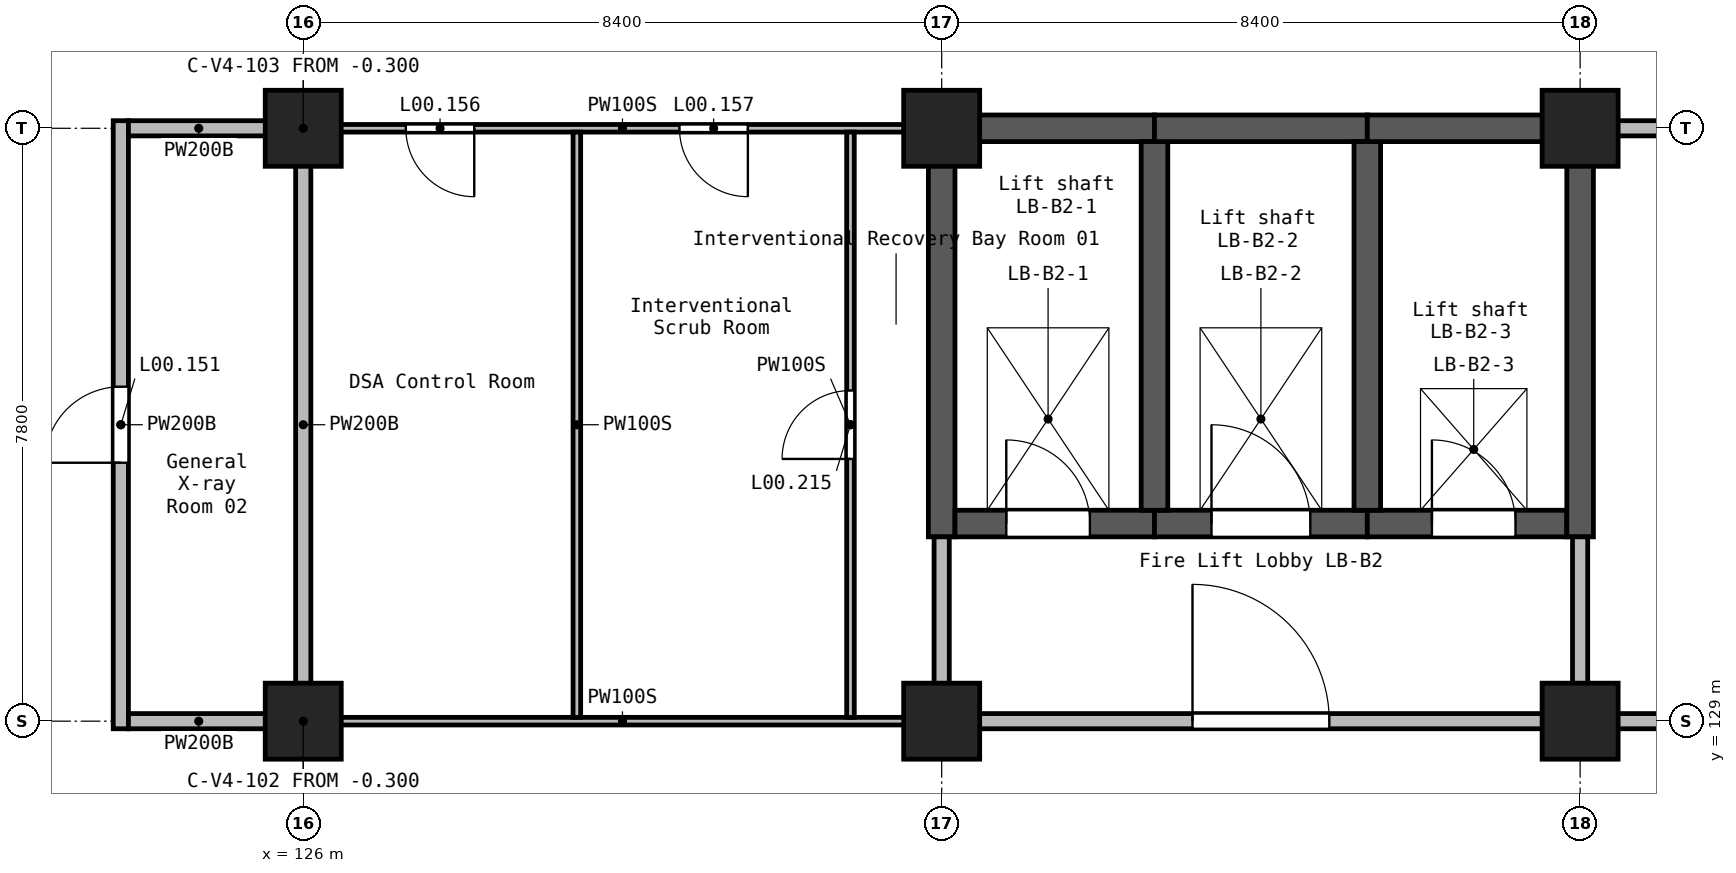
"""IFC4 building model, lengths in metres.
Left out: names, types, materials, properties, quantities, classifications, styles, units other than length and angle.
Written with IfcOpenShell. Run it as: python <this file> out.ifc"""

import sys

from ifc_helpers import new_model, si_unit, direction, frame, frame_2d, origin, origin_2d, place, context, subcontext, project, spatial, rectangle, extrude, element, fill, save


model = new_model("IFC4")
c1 = context("Model", 3, precision=1e-05, world=origin(), true_north=direction((0.0, 1.0)))
c2 = subcontext(c1, "Body", "Model", "MODEL_VIEW")
j1 = project(units=[si_unit("LENGTHUNIT", "METRE"), si_unit("PLANEANGLEUNIT", "RADIAN")], contexts=[c1])
p1 = place(None, origin())
s1 = spatial("IfcSite", under=j1, at=p1, CompositionType="ELEMENT")
p2 = place(p1, origin())
s2 = spatial("IfcBuilding", under=s1, at=p2, CompositionType="ELEMENT")
p3 = place(p2, origin())
s3 = spatial("IfcBuildingStorey", under=s2, at=p3, CompositionType="ELEMENT", Elevation=0.0)
for number, where, z_axis, x_axis in (
    (1, (126.0, 129.0, -0.3), (0.0, 0.0, 1.0), (1.0, 0.0, 0.0)),
    (2, (126.0, 136.8, -0.3), (0.0, 0.0, 1.0), (1.0, 0.0, 0.0)),
    (3, (134.4, 129.0, -0.3), (0.0, 0.0, 1.0), (1.0, 0.0, 0.0)),
    (4, (134.4, 136.8, -0.3), (0.0, 0.0, 1.0), (1.0, 0.0, 0.0)),
    (5, (142.8, 129.0, -0.3), (0.0, 0.0, 1.0), (1.0, 0.0, 0.0)),
    (6, (142.8, 136.8, -0.3), (0.0, 0.0, 1.0), (1.0, 0.0, 0.0)),
):
    element("IfcColumn", number, at=place(p3, frame(where, z_axis=z_axis, x_axis=x_axis)), inside=s3, PredefinedType="COLUMN", context=c2, shape_type="SweptSolid", body=[
        extrude(rectangle(XDim=1.0, YDim=1.0, at=origin_2d()), origin(), (0.0, 0.0, 1.0), 5.7),
    ])
p4 = place(p3, frame((134.225, 136.8, -0.3), z_axis=(0.0, 0.0, 1.0), x_axis=(1.0, 0.0, 0.0)))
e7 = element("IfcWall", 7, at=p4, inside=s3, PredefinedType="SHEAR", context=c2, shape_type="SweptSolid", body=[
    extrude(rectangle(XDim=2.975, YDim=0.35, at=frame_2d((1.487, 0.0))), origin(), (0.0, 0.0, 1.0), 5.7),
])
p5 = place(p3, frame((134.4, 131.425, -0.3), z_axis=(0.0, 0.0, 1.0), x_axis=(0.0, 1.0, 0.0)))
e8 = element("IfcWall", 8, at=p5, inside=s3, PredefinedType="SHEAR", context=c2, shape_type="SweptSolid", body=[
    extrude(rectangle(XDim=5.2, YDim=0.35, at=frame_2d((2.6, 0.0))), origin(), (0.0, 0.0, 1.0), 5.7),
])
p6 = place(p3, frame((134.575, 131.6, -0.3), z_axis=(0.0, 0.0, 1.0), x_axis=(1.0, 0.0, 0.0)))
e9 = element("IfcWall", 9, at=p6, inside=s3, PredefinedType="SHEAR", context=c2, shape_type="SweptSolid", body=[
    extrude(rectangle(XDim=2.625, YDim=0.35, at=frame_2d((1.312, 0.0))), origin(), (0.0, 0.0, 1.0), 5.7),
])
p7 = place(p6, frame((0.675, 0.0, 0.3)))
e10 = element("IfcOpeningElement", 10, at=p7, cuts=e9, PredefinedType="OPENING", context=c2, shape_type="SweptSolid", body=[
    extrude(rectangle(XDim=1.1, YDim=2.1, at=frame_2d((0.55, 1.05))), frame((0.0, 0.185, 0.0), z_axis=(0.0, -1.0, 0.0), x_axis=(1.0, 0.0, 0.0)), (0.0, 0.0, 1.0), 0.37),
])
p8 = place(p3, frame((137.2, 131.6, -0.3), z_axis=(0.0, 0.0, 1.0), x_axis=(1.0, 0.0, 0.0)))
e11 = element("IfcWall", 11, at=p8, inside=s3, PredefinedType="SHEAR", context=c2, shape_type="SweptSolid", body=[
    extrude(rectangle(XDim=2.8, YDim=0.35, at=frame_2d((1.4, 0.0))), origin(), (0.0, 0.0, 1.0), 5.7),
])
p9 = place(p8, frame((0.75, 0.0, 0.3)))
e12 = element("IfcOpeningElement", 12, at=p9, cuts=e11, PredefinedType="OPENING", context=c2, shape_type="SweptSolid", body=[
    extrude(rectangle(XDim=1.3, YDim=2.1, at=frame_2d((0.65, 1.05))), frame((0.0, 0.185, 0.0), z_axis=(0.0, -1.0, 0.0), x_axis=(1.0, 0.0, 0.0)), (0.0, 0.0, 1.0), 0.37),
])
p10 = place(p3, frame((137.2, 131.775, -0.3), z_axis=(0.0, 0.0, 1.0), x_axis=(0.0, 1.0, 0.0)))
e13 = element("IfcWall", 13, at=p10, inside=s3, PredefinedType="SHEAR", context=c2, shape_type="SweptSolid", body=[
    extrude(rectangle(XDim=4.85, YDim=0.35, at=frame_2d((2.425, 0.0))), origin(), (0.0, 0.0, 1.0), 5.7),
])
p11 = place(p3, frame((137.2, 136.8, -0.3), z_axis=(0.0, 0.0, 1.0), x_axis=(1.0, 0.0, 0.0)))
e14 = element("IfcWall", 14, at=p11, inside=s3, PredefinedType="SHEAR", context=c2, shape_type="SweptSolid", body=[
    extrude(rectangle(XDim=2.8, YDim=0.35, at=frame_2d((1.4, 0.0))), origin(), (0.0, 0.0, 1.0), 5.7),
])
p12 = place(p3, frame((140.0, 131.6, -0.3), z_axis=(0.0, 0.0, 1.0), x_axis=(1.0, 0.0, 0.0)))
e15 = element("IfcWall", 15, at=p12, inside=s3, PredefinedType="SHEAR", context=c2, shape_type="SweptSolid", body=[
    extrude(rectangle(XDim=2.625, YDim=0.35, at=frame_2d((1.312, 0.0))), origin(), (0.0, 0.0, 1.0), 5.7),
])
p13 = place(p12, frame((0.85, 0.0, 0.3)))
e16 = element("IfcOpeningElement", 16, at=p13, cuts=e15, PredefinedType="OPENING", context=c2, shape_type="SweptSolid", body=[
    extrude(rectangle(XDim=1.1, YDim=2.1, at=frame_2d((0.55, 1.05))), frame((0.0, 0.185, 0.0), z_axis=(0.0, -1.0, 0.0), x_axis=(1.0, 0.0, 0.0)), (0.0, 0.0, 1.0), 0.37),
])
p14 = place(p3, frame((140.0, 131.775, -0.3), z_axis=(0.0, 0.0, 1.0), x_axis=(0.0, 1.0, 0.0)))
e17 = element("IfcWall", 17, at=p14, inside=s3, PredefinedType="SHEAR", context=c2, shape_type="SweptSolid", body=[
    extrude(rectangle(XDim=4.85, YDim=0.35, at=frame_2d((2.425, 0.0))), origin(), (0.0, 0.0, 1.0), 5.7),
])
p15 = place(p3, frame((140.0, 136.8, -0.3), z_axis=(0.0, 0.0, 1.0), x_axis=(1.0, 0.0, 0.0)))
e18 = element("IfcWall", 18, at=p15, inside=s3, PredefinedType="SHEAR", context=c2, shape_type="SweptSolid", body=[
    extrude(rectangle(XDim=2.625, YDim=0.35, at=frame_2d((1.312, 0.0))), origin(), (0.0, 0.0, 1.0), 5.7),
])
p16 = place(p3, frame((142.8, 131.425, -0.3), z_axis=(0.0, 0.0, 1.0), x_axis=(0.0, 1.0, 0.0)))
e19 = element("IfcWall", 19, at=p16, inside=s3, PredefinedType="SHEAR", context=c2, shape_type="SweptSolid", body=[
    extrude(rectangle(XDim=5.55, YDim=0.35, at=frame_2d((2.775, 0.0))), origin(), (0.0, 0.0, 1.0), 5.7),
])
p17 = place(p3, frame((134.85, 129.0, 0.0), z_axis=(0.0, 0.0, 1.0), x_axis=(1.0, 0.0, 0.0)))
e20 = element("IfcWall", 20, at=p17, inside=s3, PredefinedType="SOLIDWALL", context=c2, shape_type="SweptSolid", body=[
    extrude(rectangle(XDim=7.5, YDim=0.2, at=frame_2d((3.75, 0.0))), origin(), (0.0, 0.0, 1.0), 5.05),
])
p18 = place(p17, frame((2.85, 0.0, 0.0)))
e21 = element("IfcOpeningElement", 21, at=p18, cuts=e20, PredefinedType="OPENING", context=c2, shape_type="SweptSolid", body=[
    extrude(rectangle(XDim=1.8, YDim=2.1, at=frame_2d((0.9, 1.05))), frame((0.0, 0.11, 0.0), z_axis=(0.0, -1.0, 0.0), x_axis=(1.0, 0.0, 0.0)), (0.0, 0.0, 1.0), 0.22),
])
for number, where, z_axis, x_axis in (
    (22, (134.4, 129.45, 0.0), (0.0, 0.0, 1.0), (0.0, 1.0, 0.0)),
    (23, (142.8, 129.45, 0.0), (0.0, 0.0, 1.0), (0.0, 1.0, 0.0)),
):
    element("IfcWall", number, at=place(p3, frame(where, z_axis=z_axis, x_axis=x_axis)), inside=s3, PredefinedType="SOLIDWALL", context=c2, shape_type="SweptSolid", body=[
        extrude(rectangle(XDim=1.975, YDim=0.2, at=frame_2d((0.988, 0.0))), origin(), (0.0, 0.0, 1.0), 5.05),
    ])
p19 = place(p3, frame((143.25, 129.0, 0.0), z_axis=(0.0, 0.0, 1.0), x_axis=(1.0, 0.0, 0.0)))
e24 = element("IfcWall", 24, at=p19, inside=s3, PredefinedType="SOLIDWALL", context=c2, shape_type="SweptSolid", body=[
    extrude(rectangle(XDim=7.5, YDim=0.2, at=frame_2d((3.75, 0.0))), origin(), (0.0, 0.0, 1.0), 5.05),
])
p20 = place(p19, frame((3.25, 0.0, 0.0)))
e25 = element("IfcOpeningElement", 25, at=p20, cuts=e24, PredefinedType="OPENING", context=c2, shape_type="SweptSolid", body=[
    extrude(rectangle(XDim=1.0, YDim=2.1, at=frame_2d((0.5, 1.05))), frame((0.0, 0.11, 0.0), z_axis=(0.0, -1.0, 0.0), x_axis=(1.0, 0.0, 0.0)), (0.0, 0.0, 1.0), 0.22),
])
p21 = place(p3, frame((143.25, 136.8, 0.0), z_axis=(0.0, 0.0, 1.0), x_axis=(1.0, 0.0, 0.0)))
e26 = element("IfcWall", 26, at=p21, inside=s3, PredefinedType="SOLIDWALL", context=c2, shape_type="SweptSolid", body=[
    extrude(rectangle(XDim=7.5, YDim=0.2, at=frame_2d((3.75, 0.0))), origin(), (0.0, 0.0, 1.0), 5.05),
])
p22 = place(p3, frame((123.6, 128.9, 0.0), z_axis=(0.0, 0.0, 1.0), x_axis=(0.0, 1.0, 0.0)))
e27 = element("IfcWall", 27, at=p22, inside=s3, PredefinedType="SOLIDWALL", context=c2, shape_type="SweptSolid", body=[
    extrude(rectangle(XDim=8.0, YDim=0.2, at=frame_2d((4.0, 0.0))), origin(), (0.0, 0.0, 1.0), 5.05),
])
p23 = place(p22, frame((3.5, 0.0, 0.0)))
e28 = element("IfcOpeningElement", 28, at=p23, cuts=e27, PredefinedType="OPENING", context=c2, shape_type="SweptSolid", body=[
    extrude(rectangle(XDim=1.0, YDim=2.1, at=frame_2d((0.5, 1.05))), frame((0.0, 0.11, 0.0), z_axis=(0.0, -1.0, 0.0), x_axis=(1.0, 0.0, 0.0)), (0.0, 0.0, 1.0), 0.22),
])
p24 = place(p3, frame((126.0, 129.45, 0.0), z_axis=(0.0, 0.0, 1.0), x_axis=(0.0, 1.0, 0.0)))
e29 = element("IfcWall", 29, at=p24, inside=s3, PredefinedType="SOLIDWALL", context=c2, shape_type="SweptSolid", body=[
    extrude(rectangle(XDim=6.9, YDim=0.2, at=frame_2d((3.45, 0.0))), origin(), (0.0, 0.0, 1.0), 5.05),
])
for number, where, z_axis, x_axis in (
    (30, (123.7, 129.0, 0.0), (0.0, 0.0, 1.0), (1.0, 0.0, 0.0)),
    (31, (123.7, 136.8, 0.0), (0.0, 0.0, 1.0), (1.0, 0.0, 0.0)),
):
    element("IfcWall", number, at=place(p3, frame(where, z_axis=z_axis, x_axis=x_axis)), inside=s3, PredefinedType="SOLIDWALL", context=c2, shape_type="SweptSolid", body=[
        extrude(rectangle(XDim=1.85, YDim=0.2, at=frame_2d((0.925, 0.0))), origin(), (0.0, 0.0, 1.0), 5.05),
    ])
p25 = place(p3, frame((133.95, 136.8, 0.0), z_axis=(0.0, 0.0, 1.0), x_axis=(-1.0, 0.0, 0.0)))
e32 = element("IfcWall", 32, at=p25, inside=s3, PredefinedType="PARTITIONING", context=c2, shape_type="SweptSolid", body=[
    extrude(rectangle(XDim=7.5, YDim=0.1, at=frame_2d((3.75, 0.0))), origin(), (0.0, 0.0, 1.0), 5.05),
])
p26 = place(p25, frame((5.7, 0.0, 0.0)))
e33 = element("IfcOpeningElement", 33, at=p26, cuts=e32, PredefinedType="OPENING", context=c2, shape_type="SweptSolid", body=[
    extrude(rectangle(XDim=0.9, YDim=2.1, at=frame_2d((0.45, 1.05))), frame((0.0, 0.06, 0.0), z_axis=(0.0, -1.0, 0.0), x_axis=(1.0, 0.0, 0.0)), (0.0, 0.0, 1.0), 0.12),
])
p27 = place(p25, frame((2.1, 0.0, 0.0)))
e34 = element("IfcOpeningElement", 34, at=p27, cuts=e32, PredefinedType="OPENING", context=c2, shape_type="SweptSolid", body=[
    extrude(rectangle(XDim=0.9, YDim=2.1, at=frame_2d((0.45, 1.05))), frame((0.0, 0.06, 0.0), z_axis=(0.0, -1.0, 0.0), x_axis=(1.0, 0.0, 0.0)), (0.0, 0.0, 1.0), 0.12),
])
p28 = place(p3, frame((133.95, 129.0, 0.0), z_axis=(0.0, 0.0, 1.0), x_axis=(-1.0, 0.0, 0.0)))
e35 = element("IfcWall", 35, at=p28, inside=s3, PredefinedType="PARTITIONING", context=c2, shape_type="SweptSolid", body=[
    extrude(rectangle(XDim=7.5, YDim=0.1, at=frame_2d((3.75, 0.0))), origin(), (0.0, 0.0, 1.0), 5.05),
])
p29 = place(p3, frame((129.6, 129.05, 0.0), z_axis=(0.0, 0.0, 1.0), x_axis=(0.0, 1.0, 0.0)))
e36 = element("IfcWall", 36, at=p29, inside=s3, PredefinedType="PARTITIONING", context=c2, shape_type="SweptSolid", body=[
    extrude(rectangle(XDim=7.7, YDim=0.1, at=frame_2d((3.85, 0.0))), origin(), (0.0, 0.0, 1.0), 5.05),
])
p30 = place(p3, frame((133.2, 129.05, 0.0), z_axis=(0.0, 0.0, 1.0), x_axis=(0.0, 1.0, 0.0)))
e37 = element("IfcWall", 37, at=p30, inside=s3, PredefinedType="PARTITIONING", context=c2, shape_type="SweptSolid", body=[
    extrude(rectangle(XDim=7.7, YDim=0.1, at=frame_2d((3.85, 0.0))), origin(), (0.0, 0.0, 1.0), 5.05),
])
p31 = place(p30, frame((3.4, 0.0, 0.0)))
e38 = element("IfcOpeningElement", 38, at=p31, cuts=e37, PredefinedType="OPENING", context=c2, shape_type="SweptSolid", body=[
    extrude(rectangle(XDim=0.9, YDim=2.1, at=frame_2d((0.45, 1.05))), frame((0.0, 0.06, 0.0), z_axis=(0.0, -1.0, 0.0), x_axis=(1.0, 0.0, 0.0)), (0.0, 0.0, 1.0), 0.12),
])
p32 = place(p18, origin())
e39 = element("IfcDoor", 39, at=p32, inside=s3, OperationType="DOUBLE_DOOR_SINGLE_SWING", PredefinedType="DOOR", context=c2, shape_type="SweptSolid", body=[
    extrude(rectangle(XDim=1.8, YDim=2.1, at=frame_2d((0.9, 1.05))), frame((0.0, 0.025, 0.0), z_axis=(0.0, -1.0, 0.0), x_axis=(1.0, 0.0, 0.0)), (0.0, 0.0, 1.0), 0.05),
])
fill(e21, e39)
p33 = place(p23, frame((1.0, 0.0, 0.0), z_axis=(0.0, 0.0, 1.0), x_axis=(-1.0, 0.0, 0.0)))
e40 = element("IfcDoor", 40, at=p33, inside=s3, OperationType="SINGLE_SWING_RIGHT", PredefinedType="DOOR", context=c2, shape_type="SweptSolid", body=[
    extrude(rectangle(XDim=1.0, YDim=2.1, at=frame_2d((0.5, 1.05))), frame((0.0, 0.025, 0.0), z_axis=(0.0, -1.0, 0.0), x_axis=(1.0, 0.0, 0.0)), (0.0, 0.0, 1.0), 0.05),
])
fill(e28, e40)
p34 = place(p26, origin())
e41 = element("IfcDoor", 41, at=p34, inside=s3, OperationType="SINGLE_SWING_RIGHT", PredefinedType="DOOR", context=c2, shape_type="SweptSolid", body=[
    extrude(rectangle(XDim=0.9, YDim=2.1, at=frame_2d((0.45, 1.05))), frame((0.0, 0.025, 0.0), z_axis=(0.0, -1.0, 0.0), x_axis=(1.0, 0.0, 0.0)), (0.0, 0.0, 1.0), 0.05),
])
fill(e33, e41)
p35 = place(p27, origin())
e42 = element("IfcDoor", 42, at=p35, inside=s3, OperationType="SINGLE_SWING_LEFT", PredefinedType="DOOR", context=c2, shape_type="SweptSolid", body=[
    extrude(rectangle(XDim=0.9, YDim=2.1, at=frame_2d((0.45, 1.05))), frame((0.0, 0.025, 0.0), z_axis=(0.0, -1.0, 0.0), x_axis=(1.0, 0.0, 0.0)), (0.0, 0.0, 1.0), 0.05),
])
fill(e34, e42)
p36 = place(p31, frame((0.9, 0.0, 0.0), z_axis=(0.0, 0.0, 1.0), x_axis=(-1.0, 0.0, 0.0)))
e43 = element("IfcDoor", 43, at=p36, inside=s3, OperationType="SINGLE_SWING_RIGHT", PredefinedType="DOOR", context=c2, shape_type="SweptSolid", body=[
    extrude(rectangle(XDim=0.9, YDim=2.1, at=frame_2d((0.45, 1.05))), frame((0.0, 0.025, 0.0), z_axis=(0.0, -1.0, 0.0), x_axis=(1.0, 0.0, 0.0)), (0.0, 0.0, 1.0), 0.05),
])
fill(e38, e43)
p37 = place(p7, origin())
e44 = element("IfcDoor", 44, at=p37, inside=s3, OperationType="DOUBLE_DOOR_SLIDING", PredefinedType="DOOR", context=c2, shape_type="SweptSolid", body=[
    extrude(rectangle(XDim=1.1, YDim=2.1, at=frame_2d((0.55, 1.05))), frame((0.0, 0.025, 0.0), z_axis=(0.0, -1.0, 0.0), x_axis=(1.0, 0.0, 0.0)), (0.0, 0.0, 1.0), 0.05),
])
fill(e10, e44)
p38 = place(p9, origin())
e45 = element("IfcDoor", 45, at=p38, inside=s3, OperationType="DOUBLE_DOOR_SLIDING", PredefinedType="DOOR", context=c2, shape_type="SweptSolid", body=[
    extrude(rectangle(XDim=1.3, YDim=2.1, at=frame_2d((0.65, 1.05))), frame((0.0, 0.025, 0.0), z_axis=(0.0, -1.0, 0.0), x_axis=(1.0, 0.0, 0.0)), (0.0, 0.0, 1.0), 0.05),
])
fill(e12, e45)
p39 = place(p13, origin())
e46 = element("IfcDoor", 46, at=p39, inside=s3, OperationType="DOUBLE_DOOR_SLIDING", PredefinedType="DOOR", context=c2, shape_type="SweptSolid", body=[
    extrude(rectangle(XDim=1.1, YDim=2.1, at=frame_2d((0.55, 1.05))), frame((0.0, 0.025, 0.0), z_axis=(0.0, -1.0, 0.0), x_axis=(1.0, 0.0, 0.0)), (0.0, 0.0, 1.0), 0.05),
])
fill(e16, e46)
save(model, sys.argv[1])
